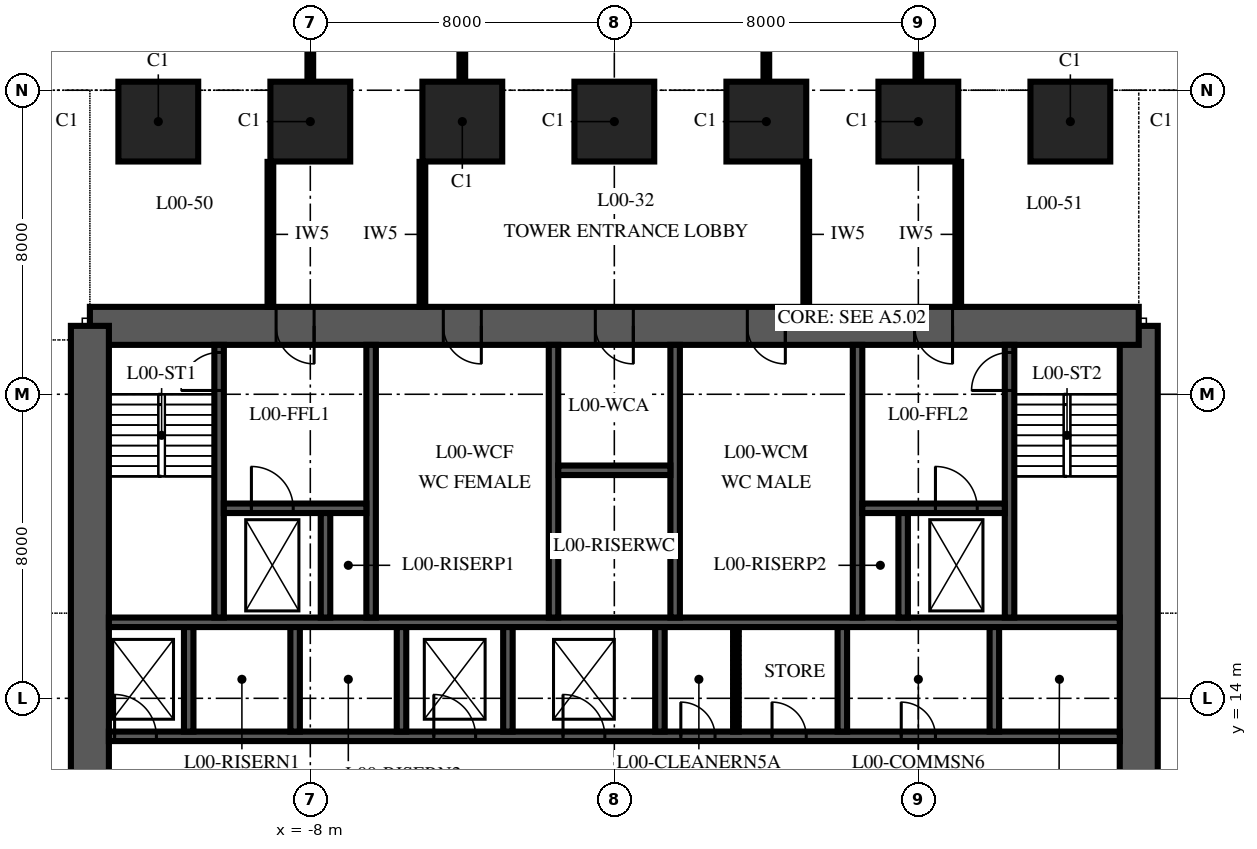
"""IFC4 building model, lengths in metres.
Left out: names, types, materials, properties, quantities, classifications, styles, units other than length and angle.
Written with IfcOpenShell. Run it as: python <this file> out.ifc"""

import sys

from ifc_helpers import new_model, si_unit, direction, frame, frame_2d, origin, origin_2d, place, context, subcontext, project, spatial, polyline, rectangle, outline, extrude, element, fill, save


model = new_model("IFC4")
c1 = context("Model", 3, precision=1e-05, world=origin(), true_north=direction((0.0, 1.0)))
c2 = subcontext(c1, "Body", "Model", "MODEL_VIEW")
j1 = project(units=[si_unit("LENGTHUNIT", "METRE"), si_unit("PLANEANGLEUNIT", "RADIAN")], contexts=[c1])
p1 = place(None, origin())
s1 = spatial("IfcSite", under=j1, at=p1, CompositionType="ELEMENT")
p2 = place(p1, origin())
s2 = spatial("IfcBuilding", under=s1, at=p2, CompositionType="ELEMENT")
p3 = place(p2, origin())
s3 = spatial("IfcBuildingStorey", under=s2, at=p3, CompositionType="ELEMENT", Elevation=0.0)
for number, where, z_axis, x_axis in (
    (1, (12.0, 29.175, 0.0), (0.0, 0.0, 1.0), (-1.0, 0.0, 0.0)),
    (2, (8.0, 29.175, 0.0), (0.0, 0.0, 1.0), (-1.0, 0.0, 0.0)),
    (3, (4.0, 29.175, 0.0), (0.0, 0.0, 1.0), (-1.0, 0.0, 0.0)),
    (4, (0.0, 29.175, 0.0), (0.0, 0.0, 1.0), (-1.0, 0.0, 0.0)),
    (5, (-4.0, 29.175, 0.0), (0.0, 0.0, 1.0), (-1.0, 0.0, 0.0)),
    (6, (-8.0, 29.175, 0.0), (0.0, 0.0, 1.0), (-1.0, 0.0, 0.0)),
    (7, (-12.0, 29.175, 0.0), (0.0, 0.0, 1.0), (-1.0, 0.0, 0.0)),
):
    element("IfcColumn", number, at=place(p3, frame(where, z_axis=z_axis, x_axis=x_axis)), inside=s3, PredefinedType="COLUMN", context=c2, shape_type="SweptSolid", body=[
        extrude(rectangle(XDim=2.1, YDim=2.1, at=origin_2d()), origin(), (0.0, 0.0, 1.0), 6.0),
    ])
p4 = place(p3, frame((13.8, 6.2, 0.0), z_axis=(0.0, 0.0, 1.0), x_axis=(0.0, 1.0, 0.0)))
e8 = element("IfcWall", 8, at=p4, inside=s3, PredefinedType="SHEAR", context=c2, shape_type="SweptSolid", body=[
    extrude(outline(polyline([(0.0, -0.5), (17.6, -0.5), (17.6, 0.0), (17.1, 0.0), (17.1, 0.5), (0.5, 0.5), (0.5, 0.0), (0.0, 0.0), (0.0, -0.5)])), origin(), (0.0, 0.0, 1.0), 6.0),
])
p5 = place(p4, frame((4.1, 0.0, 0.0)))
e9 = element("IfcOpeningElement", 9, at=p5, cuts=e8, PredefinedType="OPENING", context=c2, shape_type="SweptSolid", body=[
    extrude(rectangle(XDim=1.8, YDim=2.4, at=frame_2d((0.9, 1.2))), frame((0.0, 0.515, 0.0), z_axis=(0.0, -1.0, 0.0), x_axis=(1.0, 0.0, 0.0)), (0.0, 0.0, 1.0), 1.03),
])
p6 = place(p3, frame((13.8, 23.8, 0.0), z_axis=(0.0, 0.0, 1.0), x_axis=(-1.0, 0.0, 0.0)))
e10 = element("IfcWall", 10, at=p6, inside=s3, PredefinedType="SHEAR", context=c2, shape_type="SweptSolid", body=[
    extrude(rectangle(XDim=27.6, YDim=1.0, at=frame_2d((13.8, 0.0))), origin(), (0.0, 0.0, 1.0), 6.0),
])
p7 = place(p6, frame((21.7, 0.0, 0.0)))
e11 = element("IfcOpeningElement", 11, at=p7, cuts=e10, PredefinedType="OPENING", context=c2, shape_type="SweptSolid", body=[
    extrude(rectangle(XDim=1.0, YDim=2.1, at=frame_2d((0.5, 1.05))), frame((0.0, 0.515, 0.0), z_axis=(0.0, -1.0, 0.0), x_axis=(1.0, 0.0, 0.0)), (0.0, 0.0, 1.0), 1.03),
])
p8 = place(p6, frame((4.9, 0.0, 0.0)))
e12 = element("IfcOpeningElement", 12, at=p8, cuts=e10, PredefinedType="OPENING", context=c2, shape_type="SweptSolid", body=[
    extrude(rectangle(XDim=1.0, YDim=2.1, at=frame_2d((0.5, 1.05))), frame((0.0, 0.515, 0.0), z_axis=(0.0, -1.0, 0.0), x_axis=(1.0, 0.0, 0.0)), (0.0, 0.0, 1.0), 1.03),
])
p9 = place(p6, frame((17.3, 0.0, 0.0)))
e13 = element("IfcOpeningElement", 13, at=p9, cuts=e10, PredefinedType="OPENING", context=c2, shape_type="SweptSolid", body=[
    extrude(rectangle(XDim=1.0, YDim=2.1, at=frame_2d((0.5, 1.05))), frame((0.0, 0.515, 0.0), z_axis=(0.0, -1.0, 0.0), x_axis=(1.0, 0.0, 0.0)), (0.0, 0.0, 1.0), 1.03),
])
p10 = place(p6, frame((13.3, 0.0, 0.0)))
e14 = element("IfcOpeningElement", 14, at=p10, cuts=e10, PredefinedType="OPENING", context=c2, shape_type="SweptSolid", body=[
    extrude(rectangle(XDim=1.0, YDim=2.1, at=frame_2d((0.5, 1.05))), frame((0.0, 0.515, 0.0), z_axis=(0.0, -1.0, 0.0), x_axis=(1.0, 0.0, 0.0)), (0.0, 0.0, 1.0), 1.03),
])
p11 = place(p6, frame((9.3, 0.0, 0.0)))
e15 = element("IfcOpeningElement", 15, at=p11, cuts=e10, PredefinedType="OPENING", context=c2, shape_type="SweptSolid", body=[
    extrude(rectangle(XDim=1.0, YDim=2.1, at=frame_2d((0.5, 1.05))), frame((0.0, 0.515, 0.0), z_axis=(0.0, -1.0, 0.0), x_axis=(1.0, 0.0, 0.0)), (0.0, 0.0, 1.0), 1.03),
])
p12 = place(p3, frame((-13.8, 23.8, 0.0), z_axis=(0.0, 0.0, 1.0), x_axis=(0.0, -1.0, 0.0)))
e16 = element("IfcWall", 16, at=p12, inside=s3, PredefinedType="SHEAR", context=c2, shape_type="SweptSolid", body=[
    extrude(outline(polyline([(0.0, -0.5), (17.6, -0.5), (17.6, 0.0), (17.1, 0.0), (17.1, 0.5), (0.5, 0.5), (0.5, 0.0), (0.0, 0.0), (0.0, -0.5)])), origin(), (0.0, 0.0, 1.0), 6.0),
])
p13 = place(p12, frame((11.7, 0.0, 0.0)))
e17 = element("IfcOpeningElement", 17, at=p13, cuts=e16, PredefinedType="OPENING", context=c2, shape_type="SweptSolid", body=[
    extrude(rectangle(XDim=1.8, YDim=2.4, at=frame_2d((0.9, 1.2))), frame((0.0, 0.515, 0.0), z_axis=(0.0, -1.0, 0.0), x_axis=(1.0, 0.0, 0.0)), (0.0, 0.0, 1.0), 1.03),
])
p14 = place(p3, frame((-13.3, 13.0, 0.0), z_axis=(0.0, 0.0, 1.0), x_axis=(1.0, 0.0, 0.0)))
e18 = element("IfcWall", 18, at=p14, inside=s3, PredefinedType="SHEAR", context=c2, shape_type="SweptSolid", body=[
    extrude(rectangle(XDim=26.6, YDim=0.25, at=frame_2d((13.3, 0.0))), origin(), (0.0, 0.0, 1.0), 6.0),
])
p15 = place(p14, frame((0.15, 0.0, 0.0)))
e19 = element("IfcOpeningElement", 19, at=p15, cuts=e18, PredefinedType="OPENING", context=c2, shape_type="SweptSolid", body=[
    extrude(rectangle(XDim=1.1, YDim=2.1, at=frame_2d((0.55, 1.05))), frame((0.0, 0.14, 0.0), z_axis=(0.0, -1.0, 0.0), x_axis=(1.0, 0.0, 0.0)), (0.0, 0.0, 1.0), 0.28),
])
p16 = place(p14, frame((8.55, 0.0, 0.0)))
e20 = element("IfcOpeningElement", 20, at=p16, cuts=e18, PredefinedType="OPENING", context=c2, shape_type="SweptSolid", body=[
    extrude(rectangle(XDim=1.1, YDim=2.1, at=frame_2d((0.55, 1.05))), frame((0.0, 0.14, 0.0), z_axis=(0.0, -1.0, 0.0), x_axis=(1.0, 0.0, 0.0)), (0.0, 0.0, 1.0), 0.28),
])
p17 = place(p14, frame((11.95, 0.0, 0.0)))
e21 = element("IfcOpeningElement", 21, at=p17, cuts=e18, PredefinedType="OPENING", context=c2, shape_type="SweptSolid", body=[
    extrude(rectangle(XDim=1.1, YDim=2.1, at=frame_2d((0.55, 1.05))), frame((0.0, 0.14, 0.0), z_axis=(0.0, -1.0, 0.0), x_axis=(1.0, 0.0, 0.0)), (0.0, 0.0, 1.0), 0.28),
])
p18 = place(p14, frame((15.05, 0.0, 0.0)))
e22 = element("IfcOpeningElement", 22, at=p18, cuts=e18, PredefinedType="OPENING", context=c2, shape_type="SweptSolid", body=[
    extrude(rectangle(XDim=0.9, YDim=2.1, at=frame_2d((0.45, 1.05))), frame((0.0, 0.14, 0.0), z_axis=(0.0, -1.0, 0.0), x_axis=(1.0, 0.0, 0.0)), (0.0, 0.0, 1.0), 0.28),
])
p19 = place(p14, frame((17.45, 0.0, 0.0)))
e23 = element("IfcOpeningElement", 23, at=p19, cuts=e18, PredefinedType="OPENING", context=c2, shape_type="SweptSolid", body=[
    extrude(rectangle(XDim=0.9, YDim=2.1, at=frame_2d((0.45, 1.05))), frame((0.0, 0.14, 0.0), z_axis=(0.0, -1.0, 0.0), x_axis=(1.0, 0.0, 0.0)), (0.0, 0.0, 1.0), 0.28),
])
p20 = place(p14, frame((20.85, 0.0, 0.0)))
e24 = element("IfcOpeningElement", 24, at=p20, cuts=e18, PredefinedType="OPENING", context=c2, shape_type="SweptSolid", body=[
    extrude(rectangle(XDim=0.9, YDim=2.1, at=frame_2d((0.45, 1.05))), frame((0.0, 0.14, 0.0), z_axis=(0.0, -1.0, 0.0), x_axis=(1.0, 0.0, 0.0)), (0.0, 0.0, 1.0), 0.28),
])
p21 = place(p3, frame((-13.3, 16.0, 0.0), z_axis=(0.0, 0.0, 1.0), x_axis=(1.0, 0.0, 0.0)))
e25 = element("IfcWall", 25, at=p21, inside=s3, PredefinedType="SHEAR", context=c2, shape_type="SweptSolid", body=[
    extrude(rectangle(XDim=26.6, YDim=0.25, at=frame_2d((13.3, 0.0))), origin(), (0.0, 0.0, 1.0), 6.0),
])
for number, where, z_axis, x_axis in (
    (26, (-11.2, 13.125, 0.0), (0.0, 0.0, 1.0), (0.0, 1.0, 0.0)),
    (27, (-8.4, 13.125, 0.0), (0.0, 0.0, 1.0), (0.0, 1.0, 0.0)),
    (28, (-5.6, 13.125, 0.0), (0.0, 0.0, 1.0), (0.0, 1.0, 0.0)),
    (29, (-2.8, 13.125, 0.0), (0.0, 0.0, 1.0), (0.0, 1.0, 0.0)),
    (30, (1.2, 13.125, 0.0), (0.0, 0.0, 1.0), (0.0, 1.0, 0.0)),
    (31, (6.0, 13.125, 0.0), (0.0, 0.0, 1.0), (0.0, 1.0, 0.0)),
    (32, (10.0, 13.125, 0.0), (0.0, 0.0, 1.0), (0.0, 1.0, 0.0)),
):
    element("IfcWall", number, at=place(p3, frame(where, z_axis=z_axis, x_axis=x_axis)), inside=s3, PredefinedType="SHEAR", context=c2, shape_type="SweptSolid", body=[
        extrude(rectangle(XDim=2.75, YDim=0.25, at=frame_2d((1.375, 0.0))), origin(), (0.0, 0.0, 1.0), 6.0),
    ])
p22 = place(p3, frame((-10.4, 16.125, 0.0), z_axis=(0.0, 0.0, 1.0), x_axis=(0.0, 1.0, 0.0)))
e33 = element("IfcWall", 33, at=p22, inside=s3, PredefinedType="SHEAR", context=c2, shape_type="SweptSolid", body=[
    extrude(rectangle(XDim=7.175, YDim=0.25, at=frame_2d((3.587, 0.0))), origin(), (0.0, 0.0, 1.0), 6.0),
])
p23 = place(p22, frame((5.975, 0.0, 0.0)))
e34 = element("IfcOpeningElement", 34, at=p23, cuts=e33, PredefinedType="OPENING", context=c2, shape_type="SweptSolid", body=[
    extrude(rectangle(XDim=1.0, YDim=2.1, at=frame_2d((0.5, 1.05))), frame((0.0, 0.14, 0.0), z_axis=(0.0, -1.0, 0.0), x_axis=(1.0, 0.0, 0.0)), (0.0, 0.0, 1.0), 0.28),
])
for number, where, z_axis, x_axis in (
    (35, (-6.4, 16.125, 0.0), (0.0, 0.0, 1.0), (0.0, 1.0, 0.0)),
    (36, (-1.6, 16.125, 0.0), (0.0, 0.0, 1.0), (0.0, 1.0, 0.0)),
    (37, (1.6, 16.125, 0.0), (0.0, 0.0, 1.0), (0.0, 1.0, 0.0)),
    (38, (6.4, 16.125, 0.0), (0.0, 0.0, 1.0), (0.0, 1.0, 0.0)),
):
    element("IfcWall", number, at=place(p3, frame(where, z_axis=z_axis, x_axis=x_axis)), inside=s3, PredefinedType="SHEAR", context=c2, shape_type="SweptSolid", body=[
        extrude(rectangle(XDim=7.175, YDim=0.25, at=frame_2d((3.587, 0.0))), origin(), (0.0, 0.0, 1.0), 6.0),
    ])
p24 = place(p3, frame((10.4, 16.125, 0.0), z_axis=(0.0, 0.0, 1.0), x_axis=(0.0, 1.0, 0.0)))
e39 = element("IfcWall", 39, at=p24, inside=s3, PredefinedType="SHEAR", context=c2, shape_type="SweptSolid", body=[
    extrude(rectangle(XDim=7.175, YDim=0.25, at=frame_2d((3.587, 0.0))), origin(), (0.0, 0.0, 1.0), 6.0),
])
p25 = place(p24, frame((5.975, 0.0, 0.0)))
e40 = element("IfcOpeningElement", 40, at=p25, cuts=e39, PredefinedType="OPENING", context=c2, shape_type="SweptSolid", body=[
    extrude(rectangle(XDim=1.0, YDim=2.1, at=frame_2d((0.5, 1.05))), frame((0.0, 0.14, 0.0), z_axis=(0.0, -1.0, 0.0), x_axis=(1.0, 0.0, 0.0)), (0.0, 0.0, 1.0), 0.28),
])
p26 = place(p3, frame((-10.275, 19.0, 0.0), z_axis=(0.0, 0.0, 1.0), x_axis=(1.0, 0.0, 0.0)))
e41 = element("IfcWall", 41, at=p26, inside=s3, PredefinedType="SHEAR", context=c2, shape_type="SweptSolid", body=[
    extrude(rectangle(XDim=3.75, YDim=0.25, at=frame_2d((1.875, 0.0))), origin(), (0.0, 0.0, 1.0), 6.0),
])
p27 = place(p26, frame((0.725, 0.0, 0.0)))
e42 = element("IfcOpeningElement", 42, at=p27, cuts=e41, PredefinedType="OPENING", context=c2, shape_type="SweptSolid", body=[
    extrude(rectangle(XDim=1.1, YDim=2.1, at=frame_2d((0.55, 1.05))), frame((0.0, 0.14, 0.0), z_axis=(0.0, -1.0, 0.0), x_axis=(1.0, 0.0, 0.0)), (0.0, 0.0, 1.0), 0.28),
])
p28 = place(p3, frame((6.525, 19.0, 0.0), z_axis=(0.0, 0.0, 1.0), x_axis=(1.0, 0.0, 0.0)))
e43 = element("IfcWall", 43, at=p28, inside=s3, PredefinedType="SHEAR", context=c2, shape_type="SweptSolid", body=[
    extrude(rectangle(XDim=3.75, YDim=0.25, at=frame_2d((1.875, 0.0))), origin(), (0.0, 0.0, 1.0), 6.0),
])
p29 = place(p28, frame((1.925, 0.0, 0.0)))
e44 = element("IfcOpeningElement", 44, at=p29, cuts=e43, PredefinedType="OPENING", context=c2, shape_type="SweptSolid", body=[
    extrude(rectangle(XDim=1.1, YDim=2.1, at=frame_2d((0.55, 1.05))), frame((0.0, 0.14, 0.0), z_axis=(0.0, -1.0, 0.0), x_axis=(1.0, 0.0, 0.0)), (0.0, 0.0, 1.0), 0.28),
])
for number, where, z_axis, x_axis in (
    (45, (-7.6, 16.125, 0.0), (0.0, 0.0, 1.0), (0.0, 1.0, 0.0)),
    (46, (7.6, 16.125, 0.0), (0.0, 0.0, 1.0), (0.0, 1.0, 0.0)),
):
    element("IfcWall", number, at=place(p3, frame(where, z_axis=z_axis, x_axis=x_axis)), inside=s3, PredefinedType="SHEAR", context=c2, shape_type="SweptSolid", body=[
        extrude(rectangle(XDim=2.75, YDim=0.25, at=frame_2d((1.375, 0.0))), origin(), (0.0, 0.0, 1.0), 6.0),
    ])
p30 = place(p3, frame((-1.475, 20.0, 0.0), z_axis=(0.0, 0.0, 1.0), x_axis=(1.0, 0.0, 0.0)))
e47 = element("IfcWall", 47, at=p30, inside=s3, PredefinedType="SHEAR", context=c2, shape_type="SweptSolid", body=[
    extrude(rectangle(XDim=2.95, YDim=0.25, at=frame_2d((1.475, 0.0))), origin(), (0.0, 0.0, 1.0), 6.0),
])
p31 = place(p3, frame((3.2, 13.125, 0.0), z_axis=(0.0, 0.0, 1.0), x_axis=(0.0, 1.0, 0.0)))
e48 = element("IfcWall", 48, at=p31, inside=s3, PredefinedType="PARTITIONING", context=c2, shape_type="SweptSolid", body=[
    extrude(rectangle(XDim=2.75, YDim=0.15, at=frame_2d((1.375, 0.0))), origin(), (0.0, 0.0, 1.0), 5.85),
])
for number, where, z_axis, x_axis in (
    (49, (-9.05, 24.3, 0.0), (0.0, 0.0, 1.0), (0.0, 1.0, 0.0)),
    (50, (-5.05, 24.3, 0.0), (0.0, 0.0, 1.0), (0.0, 1.0, 0.0)),
):
    element("IfcWall", number, at=place(p3, frame(where, z_axis=z_axis, x_axis=x_axis)), inside=s3, PredefinedType="PARTITIONING", context=c2, shape_type="SweptSolid", body=[
        extrude(rectangle(XDim=3.815, YDim=0.15, at=frame_2d((1.907, 0.0))), origin(), (0.0, 0.0, 1.0), 5.7),
    ])
p32 = place(p3, frame((-8.0, 30.235, 0.0), z_axis=(0.0, 0.0, 1.0), x_axis=(0.0, 1.0, 0.0)))
e51 = element("IfcWall", 51, at=p32, inside=s3, PredefinedType="PARTITIONING", context=c2, shape_type="SweptSolid", body=[
    extrude(rectangle(XDim=7.305, YDim=0.15, at=frame_2d((3.652, 0.0))), origin(), (0.0, 0.0, 1.0), 5.7),
])
p33 = place(p3, frame((-4.0, 30.235, 0.0), z_axis=(0.0, 0.0, 1.0), x_axis=(0.0, 1.0, 0.0)))
e52 = element("IfcWall", 52, at=p33, inside=s3, PredefinedType="PARTITIONING", context=c2, shape_type="SweptSolid", body=[
    extrude(rectangle(XDim=15.315, YDim=0.15, at=frame_2d((7.657, 0.0))), origin(), (0.0, 0.0, 1.0), 5.7),
])
for number, where, z_axis, x_axis in (
    (53, (9.05, 24.3, 0.0), (0.0, 0.0, 1.0), (0.0, 1.0, 0.0)),
    (54, (5.05, 24.3, 0.0), (0.0, 0.0, 1.0), (0.0, 1.0, 0.0)),
):
    element("IfcWall", number, at=place(p3, frame(where, z_axis=z_axis, x_axis=x_axis)), inside=s3, PredefinedType="PARTITIONING", context=c2, shape_type="SweptSolid", body=[
        extrude(rectangle(XDim=3.815, YDim=0.15, at=frame_2d((1.907, 0.0))), origin(), (0.0, 0.0, 1.0), 5.7),
    ])
p34 = place(p3, frame((8.0, 30.235, 0.0), z_axis=(0.0, 0.0, 1.0), x_axis=(0.0, 1.0, 0.0)))
e55 = element("IfcWall", 55, at=p34, inside=s3, PredefinedType="PARTITIONING", context=c2, shape_type="SweptSolid", body=[
    extrude(rectangle(XDim=7.305, YDim=0.15, at=frame_2d((3.652, 0.0))), origin(), (0.0, 0.0, 1.0), 5.7),
])
p35 = place(p3, frame((4.0, 30.235, 0.0), z_axis=(0.0, 0.0, 1.0), x_axis=(0.0, 1.0, 0.0)))
e56 = element("IfcWall", 56, at=p35, inside=s3, PredefinedType="PARTITIONING", context=c2, shape_type="SweptSolid", body=[
    extrude(rectangle(XDim=15.315, YDim=0.15, at=frame_2d((7.657, 0.0))), origin(), (0.0, 0.0, 1.0), 5.7),
])
p36 = place(p7, origin())
e57 = element("IfcDoor", 57, at=p36, inside=s3, OperationType="SINGLE_SWING_RIGHT", PredefinedType="DOOR", context=c2, shape_type="SweptSolid", body=[
    extrude(rectangle(XDim=1.0, YDim=2.1, at=frame_2d((0.5, 1.05))), frame((0.0, 0.5, 0.0), z_axis=(0.0, -1.0, 0.0), x_axis=(1.0, 0.0, 0.0)), (0.0, 0.0, 1.0), 1.0),
])
fill(e11, e57)
p37 = place(p8, origin())
e58 = element("IfcDoor", 58, at=p37, inside=s3, OperationType="SINGLE_SWING_RIGHT", PredefinedType="DOOR", context=c2, shape_type="SweptSolid", body=[
    extrude(rectangle(XDim=1.0, YDim=2.1, at=frame_2d((0.5, 1.05))), frame((0.0, 0.5, 0.0), z_axis=(0.0, -1.0, 0.0), x_axis=(1.0, 0.0, 0.0)), (0.0, 0.0, 1.0), 1.0),
])
fill(e12, e58)
p38 = place(p9, origin())
e59 = element("IfcDoor", 59, at=p38, inside=s3, OperationType="SINGLE_SWING_LEFT", PredefinedType="DOOR", context=c2, shape_type="SweptSolid", body=[
    extrude(rectangle(XDim=1.0, YDim=2.1, at=frame_2d((0.5, 1.05))), frame((0.0, 0.5, 0.0), z_axis=(0.0, -1.0, 0.0), x_axis=(1.0, 0.0, 0.0)), (0.0, 0.0, 1.0), 1.0),
])
fill(e13, e59)
p39 = place(p10, origin())
e60 = element("IfcDoor", 60, at=p39, inside=s3, OperationType="SINGLE_SWING_LEFT", PredefinedType="DOOR", context=c2, shape_type="SweptSolid", body=[
    extrude(rectangle(XDim=1.0, YDim=2.1, at=frame_2d((0.5, 1.05))), frame((0.0, 0.5, 0.0), z_axis=(0.0, -1.0, 0.0), x_axis=(1.0, 0.0, 0.0)), (0.0, 0.0, 1.0), 1.0),
])
fill(e14, e60)
p40 = place(p11, origin())
e61 = element("IfcDoor", 61, at=p40, inside=s3, OperationType="SINGLE_SWING_LEFT", PredefinedType="DOOR", context=c2, shape_type="SweptSolid", body=[
    extrude(rectangle(XDim=1.0, YDim=2.1, at=frame_2d((0.5, 1.05))), frame((0.0, 0.5, 0.0), z_axis=(0.0, -1.0, 0.0), x_axis=(1.0, 0.0, 0.0)), (0.0, 0.0, 1.0), 1.0),
])
fill(e15, e61)
p41 = place(p23, origin())
e62 = element("IfcDoor", 62, at=p41, inside=s3, OperationType="SINGLE_SWING_LEFT", PredefinedType="DOOR", context=c2, shape_type="SweptSolid", body=[
    extrude(rectangle(XDim=1.0, YDim=2.1, at=frame_2d((0.5, 1.05))), frame((0.0, 0.125, 0.0), z_axis=(0.0, -1.0, 0.0), x_axis=(1.0, 0.0, 0.0)), (0.0, 0.0, 1.0), 0.25),
])
fill(e34, e62)
p42 = place(p25, origin())
e63 = element("IfcDoor", 63, at=p42, inside=s3, OperationType="SINGLE_SWING_LEFT", PredefinedType="DOOR", context=c2, shape_type="SweptSolid", body=[
    extrude(rectangle(XDim=1.0, YDim=2.1, at=frame_2d((0.5, 1.05))), frame((0.0, 0.125, 0.0), z_axis=(0.0, -1.0, 0.0), x_axis=(1.0, 0.0, 0.0)), (0.0, 0.0, 1.0), 0.25),
])
fill(e40, e63)
p43 = place(p15, origin())
e64 = element("IfcDoor", 64, at=p43, inside=s3, OperationType="SLIDING_TO_LEFT", PredefinedType="DOOR", context=c2, shape_type="SweptSolid", body=[
    extrude(rectangle(XDim=1.1, YDim=2.1, at=frame_2d((0.55, 1.05))), frame((0.0, 0.125, 0.0), z_axis=(0.0, -1.0, 0.0), x_axis=(1.0, 0.0, 0.0)), (0.0, 0.0, 1.0), 0.25),
])
fill(e19, e64)
p44 = place(p16, origin())
e65 = element("IfcDoor", 65, at=p44, inside=s3, OperationType="SLIDING_TO_LEFT", PredefinedType="DOOR", context=c2, shape_type="SweptSolid", body=[
    extrude(rectangle(XDim=1.1, YDim=2.1, at=frame_2d((0.55, 1.05))), frame((0.0, 0.125, 0.0), z_axis=(0.0, -1.0, 0.0), x_axis=(1.0, 0.0, 0.0)), (0.0, 0.0, 1.0), 0.25),
])
fill(e20, e65)
p45 = place(p17, origin())
e66 = element("IfcDoor", 66, at=p45, inside=s3, OperationType="SLIDING_TO_LEFT", PredefinedType="DOOR", context=c2, shape_type="SweptSolid", body=[
    extrude(rectangle(XDim=1.1, YDim=2.1, at=frame_2d((0.55, 1.05))), frame((0.0, 0.125, 0.0), z_axis=(0.0, -1.0, 0.0), x_axis=(1.0, 0.0, 0.0)), (0.0, 0.0, 1.0), 0.25),
])
fill(e21, e66)
p46 = place(p29, origin())
e67 = element("IfcDoor", 67, at=p46, inside=s3, OperationType="SLIDING_TO_RIGHT", PredefinedType="DOOR", context=c2, shape_type="SweptSolid", body=[
    extrude(rectangle(XDim=1.1, YDim=2.1, at=frame_2d((0.55, 1.05))), frame((0.0, 0.125, 0.0), z_axis=(0.0, -1.0, 0.0), x_axis=(1.0, 0.0, 0.0)), (0.0, 0.0, 1.0), 0.25),
])
fill(e44, e67)
p47 = place(p27, origin())
e68 = element("IfcDoor", 68, at=p47, inside=s3, OperationType="SLIDING_TO_RIGHT", PredefinedType="DOOR", context=c2, shape_type="SweptSolid", body=[
    extrude(rectangle(XDim=1.1, YDim=2.1, at=frame_2d((0.55, 1.05))), frame((0.0, 0.125, 0.0), z_axis=(0.0, -1.0, 0.0), x_axis=(1.0, 0.0, 0.0)), (0.0, 0.0, 1.0), 0.25),
])
fill(e42, e68)
p48 = place(p18, origin())
e69 = element("IfcDoor", 69, at=p48, inside=s3, OperationType="SINGLE_SWING_LEFT", PredefinedType="DOOR", context=c2, shape_type="SweptSolid", body=[
    extrude(rectangle(XDim=0.9, YDim=2.1, at=frame_2d((0.45, 1.05))), frame((0.0, 0.125, 0.0), z_axis=(0.0, -1.0, 0.0), x_axis=(1.0, 0.0, 0.0)), (0.0, 0.0, 1.0), 0.25),
])
fill(e22, e69)
p49 = place(p19, origin())
e70 = element("IfcDoor", 70, at=p49, inside=s3, OperationType="SINGLE_SWING_LEFT", PredefinedType="DOOR", context=c2, shape_type="SweptSolid", body=[
    extrude(rectangle(XDim=0.9, YDim=2.1, at=frame_2d((0.45, 1.05))), frame((0.0, 0.125, 0.0), z_axis=(0.0, -1.0, 0.0), x_axis=(1.0, 0.0, 0.0)), (0.0, 0.0, 1.0), 0.25),
])
fill(e23, e70)
p50 = place(p20, origin())
e71 = element("IfcDoor", 71, at=p50, inside=s3, OperationType="SINGLE_SWING_LEFT", PredefinedType="DOOR", context=c2, shape_type="SweptSolid", body=[
    extrude(rectangle(XDim=0.9, YDim=2.1, at=frame_2d((0.45, 1.05))), frame((0.0, 0.125, 0.0), z_axis=(0.0, -1.0, 0.0), x_axis=(1.0, 0.0, 0.0)), (0.0, 0.0, 1.0), 0.25),
])
fill(e24, e71)
save(model, sys.argv[1])
